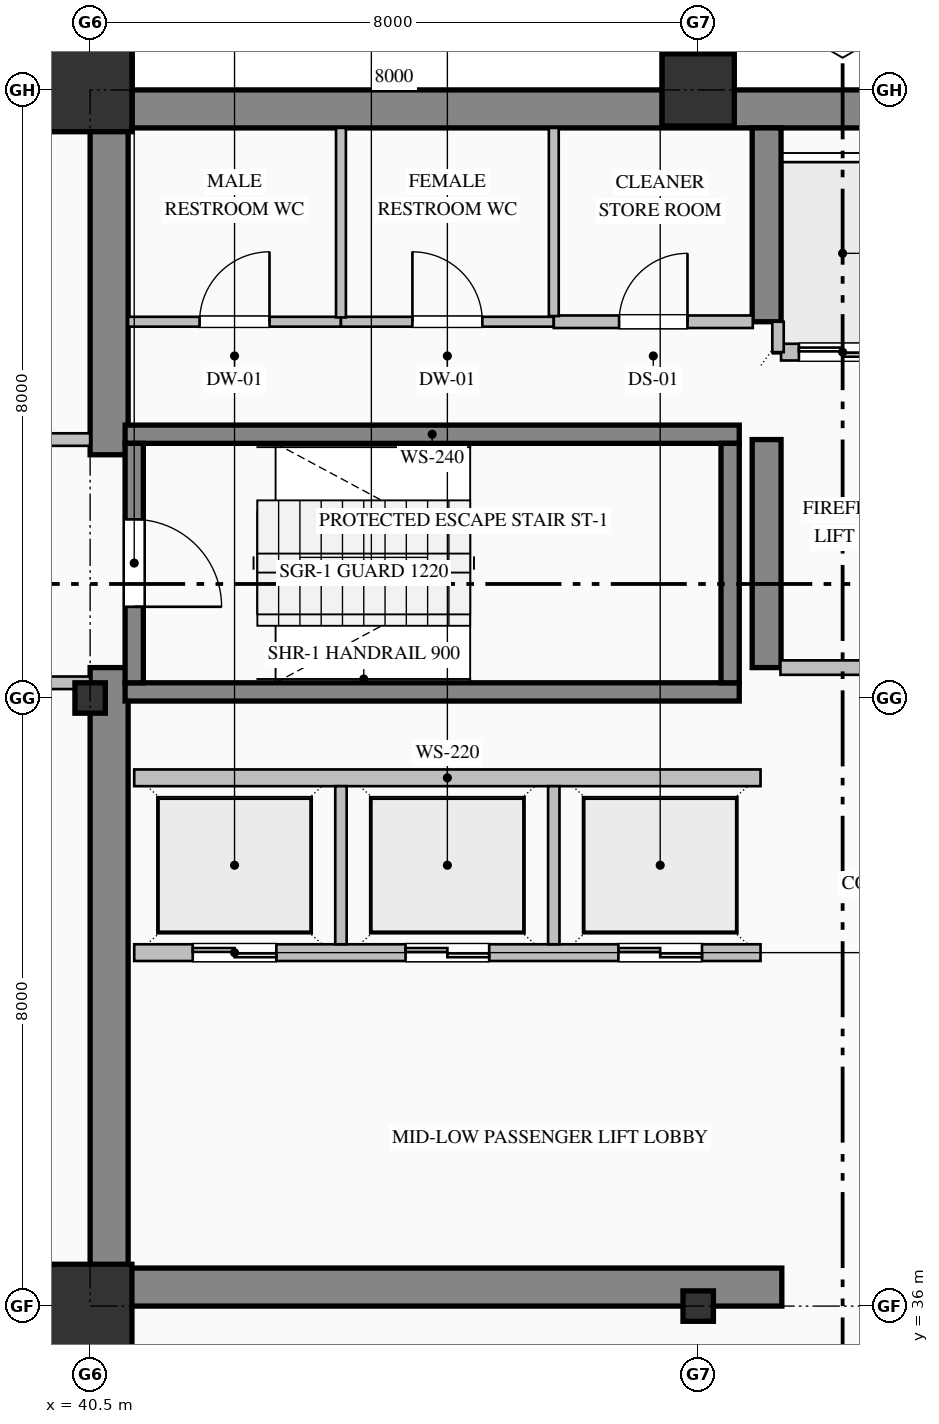
"""IFC4 building model, lengths in metres.
Left out: names, types, materials, properties, quantities, classifications, styles, units other than length and angle.
Written with IfcOpenShell. Run it as: python <this file> out.ifc"""

import sys

from ifc_helpers import new_model, si_unit, direction, frame, frame_2d, origin, origin_2d, place, context, subcontext, project, spatial, rectangle, hollow_rectangle, i_section, extrude, element, fill, save


model = new_model("IFC4")
c1 = context("Model", 3, precision=1e-05, world=origin(), true_north=direction((0.0, 1.0)))
c2 = subcontext(c1, "Body", "Model", "MODEL_VIEW")
j1 = project(units=[si_unit("LENGTHUNIT", "METRE"), si_unit("PLANEANGLEUNIT", "RADIAN")], contexts=[c1])
p1 = place(None, origin())
s1 = spatial("IfcSite", under=j1, at=p1, CompositionType="ELEMENT")
p2 = place(p1, origin())
s2 = spatial("IfcBuilding", under=s1, at=p2, CompositionType="ELEMENT")
p3 = place(p2, frame((0.0, 0.0, 187.0)))
s3 = spatial("IfcBuildingStorey", under=s2, at=p3, CompositionType="ELEMENT", Elevation=187.0)
p4 = place(p3, frame((40.5, 51.75, 0.0), z_axis=(0.0, 0.0, 1.0), x_axis=(1.0, 0.0, 0.0)))
e1 = element("IfcWall", 1, at=p4, inside=s3, PredefinedType="SHEAR", context=c2, shape_type="SweptSolid", body=[
    extrude(rectangle(XDim=23.5, YDim=0.5, at=frame_2d((11.75, 0.0))), origin(), (0.0, 0.0, 1.0), 3.765),
])
p5 = place(p3, frame((40.75, 36.5, 0.0), z_axis=(0.0, 0.0, 1.0), x_axis=(0.0, 1.0, 0.0)))
e2 = element("IfcWall", 2, at=p5, inside=s3, PredefinedType="SHEAR", context=c2, shape_type="SweptSolid", body=[
    extrude(rectangle(XDim=7.9, YDim=0.5, at=frame_2d((3.95, 0.0))), origin(), (0.0, 0.0, 1.0), 3.765),
])
p6 = place(p3, frame((40.75, 47.2, 0.0), z_axis=(0.0, 0.0, 1.0), x_axis=(0.0, 1.0, 0.0)))
e3 = element("IfcWall", 3, at=p6, inside=s3, PredefinedType="SHEAR", context=c2, shape_type="SweptSolid", body=[
    extrude(rectangle(XDim=4.3, YDim=0.5, at=frame_2d((2.15, 0.0))), origin(), (0.0, 0.0, 1.0), 3.765),
])
p7 = place(p3, frame((40.5, 36.25, 0.0), z_axis=(0.0, 0.0, 1.0), x_axis=(1.0, 0.0, 0.0)))
e4 = element("IfcWall", 4, at=p7, inside=s3, PredefinedType="SHEAR", context=c2, shape_type="SweptSolid", body=[
    extrude(rectangle(XDim=9.1, YDim=0.5, at=frame_2d((4.55, 0.0))), origin(), (0.0, 0.0, 1.0), 3.765),
])
p8 = place(p3, frame((49.4, 44.4, 0.0), z_axis=(0.0, 0.0, 1.0), x_axis=(0.0, 1.0, 0.0)))
e5 = element("IfcWall", 5, at=p8, inside=s3, PredefinedType="SHEAR", context=c2, shape_type="SweptSolid", body=[
    extrude(rectangle(XDim=3.0, YDim=0.38, at=frame_2d((1.5, 0.0))), origin(), (0.0, 0.0, 1.0), 3.765),
])
p9 = place(p3, frame((49.4, 48.95, 0.0), z_axis=(0.0, 0.0, 1.0), x_axis=(0.0, 1.0, 0.0)))
e6 = element("IfcWall", 6, at=p9, inside=s3, PredefinedType="SHEAR", context=c2, shape_type="SweptSolid", body=[
    extrude(rectangle(XDim=2.55, YDim=0.38, at=frame_2d((1.275, 0.0))), origin(), (0.0, 0.0, 1.0), 3.765),
])
p10 = place(p3, frame((40.5, 36.0, 0.0), z_axis=(0.0, 0.0, 1.0), x_axis=(1.0, 0.0, 0.0)))
e7 = element("IfcColumn", 7, at=p10, inside=s3, PredefinedType="COLUMN", context=c2, shape_type="SweptSolid", body=[
    extrude(hollow_rectangle(XDim=1.1, YDim=1.1, WallThickness=0.04, at=origin_2d()), origin(), (0.0, 0.0, 1.0), 4.0),
])
p11 = place(p3, frame((40.5, 44.0, 0.0), z_axis=(0.0, 0.0, 1.0), x_axis=(1.0, 0.0, 0.0)))
e8 = element("IfcColumn", 8, at=p11, inside=s3, PredefinedType="COLUMN", context=c2, shape_type="SweptSolid", body=[
    extrude(i_section(OverallWidth=0.4, OverallDepth=0.4, WebThickness=0.013, FlangeThickness=0.021, FilletRadius=0.022, at=origin_2d()), origin(), (0.0, 0.0, 1.0), 4.0),
])
p12 = place(p3, frame((40.5, 52.0, 0.0), z_axis=(0.0, 0.0, 1.0), x_axis=(1.0, 0.0, 0.0)))
e9 = element("IfcColumn", 9, at=p12, inside=s3, PredefinedType="COLUMN", context=c2, shape_type="SweptSolid", body=[
    extrude(hollow_rectangle(XDim=1.1, YDim=1.1, WallThickness=0.04, at=origin_2d()), origin(), (0.0, 0.0, 1.0), 4.0),
])
p13 = place(p3, frame((48.5, 36.0, 0.0), z_axis=(0.0, 0.0, 1.0), x_axis=(1.0, 0.0, 0.0)))
e10 = element("IfcColumn", 10, at=p13, inside=s3, PredefinedType="COLUMN", context=c2, shape_type="SweptSolid", body=[
    extrude(i_section(OverallWidth=0.4, OverallDepth=0.4, WebThickness=0.013, FlangeThickness=0.021, FilletRadius=0.022, at=origin_2d()), origin(), (0.0, 0.0, 1.0), 4.0),
])
p14 = place(p3, frame((48.5, 52.0, 0.0), z_axis=(0.0, 0.0, 1.0), x_axis=(1.0, 0.0, 0.0)))
e11 = element("IfcColumn", 11, at=p14, inside=s3, PredefinedType="COLUMN", context=c2, shape_type="SweptSolid", body=[
    extrude(hollow_rectangle(XDim=0.95, YDim=0.95, WallThickness=0.036, at=origin_2d()), origin(), (0.0, 0.0, 1.0), 4.0),
])
p15 = place(p3, frame((13.0, 51.83, 0.0), z_axis=(0.0, 0.0, 1.0), x_axis=(1.0, 0.0, 0.0)))
e12 = element("IfcWall", 12, at=p15, inside=s3, PredefinedType="SOLIDWALL", context=c2, shape_type="SweptSolid", body=[
    extrude(rectangle(XDim=27.52, YDim=0.34, at=frame_2d((13.76, 0.0))), origin(), (0.0, 0.0, 1.0), 3.265),
])
p16 = place(p15, frame((6.45, 0.0, 0.85)))
e13 = element("IfcOpeningElement", 13, at=p16, cuts=e12, PredefinedType="OPENING", context=c2, shape_type="SweptSolid", body=[
    extrude(rectangle(XDim=1.5, YDim=1.95, at=frame_2d((0.75, 0.975))), frame((0.0, 0.18, 0.0), z_axis=(0.0, -1.0, 0.0), x_axis=(1.0, 0.0, 0.0)), (0.0, 0.0, 1.0), 0.36),
])
p17 = place(p15, frame((13.8, 0.0, 0.7)))
e14 = element("IfcOpeningElement", 14, at=p17, cuts=e12, PredefinedType="OPENING", context=c2, shape_type="SweptSolid", body=[
    extrude(rectangle(XDim=1.2, YDim=1.85, at=frame_2d((0.6, 0.925))), frame((0.0, 0.18, 0.0), z_axis=(0.0, -1.0, 0.0), x_axis=(1.0, 0.0, 0.0)), (0.0, 0.0, 1.0), 0.36),
])
for number, where, z_axis, x_axis in (
    (15, (40.96, 47.47, 0.0), (0.0, 0.0, 1.0), (1.0, 0.0, 0.0)),
    (16, (49.04, 44.08, 0.0), (0.0, 0.0, 1.0), (-1.0, 0.0, 0.0)),
):
    element("IfcWall", number, at=place(p3, frame(where, z_axis=z_axis, x_axis=x_axis)), inside=s3, PredefinedType="SOLIDWALL", context=c2, shape_type="SweptSolid", body=[
        extrude(rectangle(XDim=8.08, YDim=0.24, at=frame_2d((4.04, 0.0))), origin(), (0.0, 0.0, 1.0), 4.0),
    ])
p18 = place(p3, frame((41.08, 47.35, 0.0), z_axis=(0.0, 0.0, 1.0), x_axis=(0.0, -1.0, 0.0)))
e17 = element("IfcWall", 17, at=p18, inside=s3, PredefinedType="SOLIDWALL", context=c2, shape_type="SweptSolid", body=[
    extrude(rectangle(XDim=3.15, YDim=0.24, at=frame_2d((1.575, 0.0))), origin(), (0.0, 0.0, 1.0), 4.0),
])
p19 = place(p18, frame((1.0, 0.0, 0.0)))
e18 = element("IfcOpeningElement", 18, at=p19, cuts=e17, PredefinedType="OPENING", context=c2, shape_type="SweptSolid", body=[
    extrude(rectangle(XDim=1.15, YDim=2.2, at=frame_2d((0.575, 1.1))), frame((0.0, 0.13, 0.0), z_axis=(0.0, -1.0, 0.0), x_axis=(1.0, 0.0, 0.0)), (0.0, 0.0, 1.0), 0.26),
])
p20 = place(p3, frame((48.92, 44.2, 0.0), z_axis=(0.0, 0.0, 1.0), x_axis=(0.0, 1.0, 0.0)))
e19 = element("IfcWall", 19, at=p20, inside=s3, PredefinedType="SOLIDWALL", context=c2, shape_type="SweptSolid", body=[
    extrude(rectangle(XDim=3.15, YDim=0.24, at=frame_2d((1.575, 0.0))), origin(), (0.0, 0.0, 1.0), 4.0),
])
p21 = place(p3, frame((54.71, 48.55, 0.0), z_axis=(0.0, 0.0, 1.0), x_axis=(-1.0, 0.0, 0.0)))
e20 = element("IfcWall", 20, at=p21, inside=s3, PredefinedType="PARTITIONING", context=c2, shape_type="SweptSolid", body=[
    extrude(rectangle(XDim=5.12, YDim=0.22, at=frame_2d((2.56, 0.0))), origin(), (0.0, 0.0, 1.0), 3.765),
])
p22 = place(p21, frame((3.735, 0.0, 0.0)))
e21 = element("IfcOpeningElement", 21, at=p22, cuts=e20, PredefinedType="OPENING", context=c2, shape_type="SweptSolid", body=[
    extrude(rectangle(XDim=1.15, YDim=2.2, at=frame_2d((0.575, 1.1))), frame((0.0, 0.12, 0.0), z_axis=(0.0, -1.0, 0.0), x_axis=(1.0, 0.0, 0.0)), (0.0, 0.0, 1.0), 0.24),
])
p23 = place(p21, frame((0.935, 0.0, 0.0)))
e22 = element("IfcOpeningElement", 22, at=p23, cuts=e20, PredefinedType="OPENING", context=c2, shape_type="SweptSolid", body=[
    extrude(rectangle(XDim=1.15, YDim=2.2, at=frame_2d((0.575, 1.1))), frame((0.0, 0.12, 0.0), z_axis=(0.0, -1.0, 0.0), x_axis=(1.0, 0.0, 0.0)), (0.0, 0.0, 1.0), 0.24),
])
p24 = place(p3, frame((49.55, 48.55, 0.0), z_axis=(0.0, 0.0, 1.0), x_axis=(0.0, 1.0, 0.0)))
e23 = element("IfcWall", 23, at=p24, inside=s3, PredefinedType="PARTITIONING", context=c2, shape_type="SweptSolid", body=[
    extrude(rectangle(XDim=0.4, YDim=0.15, at=frame_2d((0.2, 0.0))), origin(), (0.0, 0.0, 1.0), 3.765),
])
p25 = place(p3, frame((49.32, 40.65, 0.0), z_axis=(0.0, 0.0, 1.0), x_axis=(-1.0, 0.0, 0.0)))
e24 = element("IfcWall", 24, at=p25, inside=s3, PredefinedType="PARTITIONING", context=c2, shape_type="SweptSolid", body=[
    extrude(rectangle(XDim=8.24, YDim=0.22, at=frame_2d((4.12, 0.0))), origin(), (0.0, 0.0, 1.0), 3.765),
])
p26 = place(p25, frame((6.37, 0.0, 0.0)))
e25 = element("IfcOpeningElement", 25, at=p26, cuts=e24, PredefinedType="OPENING", context=c2, shape_type="SweptSolid", body=[
    extrude(rectangle(XDim=1.1, YDim=2.2, at=frame_2d((0.55, 1.1))), frame((0.0, 0.12, 0.0), z_axis=(0.0, -1.0, 0.0), x_axis=(1.0, 0.0, 0.0)), (0.0, 0.0, 1.0), 0.24),
])
p27 = place(p25, frame((3.57, 0.0, 0.0)))
e26 = element("IfcOpeningElement", 26, at=p27, cuts=e24, PredefinedType="OPENING", context=c2, shape_type="SweptSolid", body=[
    extrude(rectangle(XDim=1.1, YDim=2.2, at=frame_2d((0.55, 1.1))), frame((0.0, 0.12, 0.0), z_axis=(0.0, -1.0, 0.0), x_axis=(1.0, 0.0, 0.0)), (0.0, 0.0, 1.0), 0.24),
])
p28 = place(p25, frame((0.77, 0.0, 0.0)))
e27 = element("IfcOpeningElement", 27, at=p28, cuts=e24, PredefinedType="OPENING", context=c2, shape_type="SweptSolid", body=[
    extrude(rectangle(XDim=1.1, YDim=2.2, at=frame_2d((0.55, 1.1))), frame((0.0, 0.12, 0.0), z_axis=(0.0, -1.0, 0.0), x_axis=(1.0, 0.0, 0.0)), (0.0, 0.0, 1.0), 0.24),
])
p29 = place(p3, frame((41.08, 42.95, 0.0), z_axis=(0.0, 0.0, 1.0), x_axis=(1.0, 0.0, 0.0)))
e28 = element("IfcWall", 28, at=p29, inside=s3, PredefinedType="PARTITIONING", context=c2, shape_type="SweptSolid", body=[
    extrude(rectangle(XDim=8.24, YDim=0.22, at=frame_2d((4.12, 0.0))), origin(), (0.0, 0.0, 1.0), 3.765),
])
for number, where, z_axis, x_axis in (
    (29, (43.8, 40.76, 0.0), (0.0, 0.0, 1.0), (0.0, 1.0, 0.0)),
    (30, (46.6, 40.76, 0.0), (0.0, 0.0, 1.0), (0.0, 1.0, 0.0)),
):
    element("IfcWall", number, at=place(p3, frame(where, z_axis=z_axis, x_axis=x_axis)), inside=s3, PredefinedType="PARTITIONING", context=c2, shape_type="SweptSolid", body=[
        extrude(rectangle(XDim=2.08, YDim=0.15, at=frame_2d((1.04, 0.0))), origin(), (0.0, 0.0, 1.0), 3.765),
    ])
p30 = place(p3, frame((37.8, 47.4, 0.0), z_axis=(0.0, 0.0, 1.0), x_axis=(1.0, 0.0, 0.0)))
e31 = element("IfcWall", 31, at=p30, inside=s3, PredefinedType="PARTITIONING", context=c2, shape_type="SweptSolid", body=[
    extrude(rectangle(XDim=2.7, YDim=0.165, at=frame_2d((1.35, 0.0))), origin(), (0.0, 0.0, 1.0), 3.765),
])
p31 = place(p30, frame((0.825, 0.0, 0.0)))
e32 = element("IfcOpeningElement", 32, at=p31, cuts=e31, PredefinedType="OPENING", context=c2, shape_type="SweptSolid", body=[
    extrude(rectangle(XDim=1.05, YDim=2.15, at=frame_2d((0.525, 1.075))), frame((0.0, 0.093, 0.0), z_axis=(0.0, -1.0, 0.0), x_axis=(1.0, 0.0, 0.0)), (0.0, 0.0, 1.0), 0.185),
])
p32 = place(p3, frame((40.5, 44.2, 0.0), z_axis=(0.0, 0.0, 1.0), x_axis=(-1.0, 0.0, 0.0)))
e33 = element("IfcWall", 33, at=p32, inside=s3, PredefinedType="PARTITIONING", context=c2, shape_type="SweptSolid", body=[
    extrude(rectangle(XDim=2.7, YDim=0.165, at=frame_2d((1.35, 0.0))), origin(), (0.0, 0.0, 1.0), 3.765),
])
p33 = place(p32, frame((0.825, 0.0, 0.0)))
e34 = element("IfcOpeningElement", 34, at=p33, cuts=e33, PredefinedType="OPENING", context=c2, shape_type="SweptSolid", body=[
    extrude(rectangle(XDim=1.05, YDim=2.15, at=frame_2d((0.525, 1.075))), frame((0.0, 0.093, 0.0), z_axis=(0.0, -1.0, 0.0), x_axis=(1.0, 0.0, 0.0)), (0.0, 0.0, 1.0), 0.185),
])
p34 = place(p3, frame((41.0, 48.95, 0.0), z_axis=(0.0, 0.0, 1.0), x_axis=(1.0, 0.0, 0.0)))
e35 = element("IfcWall", 35, at=p34, inside=s3, PredefinedType="PARTITIONING", context=c2, shape_type="SweptSolid", body=[
    extrude(rectangle(XDim=2.8, YDim=0.13, at=frame_2d((1.4, 0.0))), origin(), (0.0, 0.0, 1.0), 3.765),
])
p35 = place(p34, frame((0.94, 0.0, 0.0)))
e36 = element("IfcOpeningElement", 36, at=p35, cuts=e35, PredefinedType="OPENING", context=c2, shape_type="SweptSolid", body=[
    extrude(rectangle(XDim=0.92, YDim=2.15, at=frame_2d((0.46, 1.075))), frame((0.0, 0.075, 0.0), z_axis=(0.0, -1.0, 0.0), x_axis=(1.0, 0.0, 0.0)), (0.0, 0.0, 1.0), 0.15),
])
p36 = place(p3, frame((43.8, 48.95, 0.0), z_axis=(0.0, 0.0, 1.0), x_axis=(1.0, 0.0, 0.0)))
e37 = element("IfcWall", 37, at=p36, inside=s3, PredefinedType="PARTITIONING", context=c2, shape_type="SweptSolid", body=[
    extrude(rectangle(XDim=2.8, YDim=0.13, at=frame_2d((1.4, 0.0))), origin(), (0.0, 0.0, 1.0), 3.765),
])
p37 = place(p36, frame((0.94, 0.0, 0.0)))
e38 = element("IfcOpeningElement", 38, at=p37, cuts=e37, PredefinedType="OPENING", context=c2, shape_type="SweptSolid", body=[
    extrude(rectangle(XDim=0.92, YDim=2.15, at=frame_2d((0.46, 1.075))), frame((0.0, 0.075, 0.0), z_axis=(0.0, -1.0, 0.0), x_axis=(1.0, 0.0, 0.0)), (0.0, 0.0, 1.0), 0.15),
])
p38 = place(p3, frame((46.6, 48.95, 0.0), z_axis=(0.0, 0.0, 1.0), x_axis=(1.0, 0.0, 0.0)))
e39 = element("IfcWall", 39, at=p38, inside=s3, PredefinedType="PARTITIONING", context=c2, shape_type="SweptSolid", body=[
    extrude(rectangle(XDim=2.618, YDim=0.165, at=frame_2d((1.309, 0.0))), origin(), (0.0, 0.0, 1.0), 3.765),
])
p39 = place(p38, frame((0.859, 0.0, 0.0)))
e40 = element("IfcOpeningElement", 40, at=p39, cuts=e39, PredefinedType="OPENING", context=c2, shape_type="SweptSolid", body=[
    extrude(rectangle(XDim=0.9, YDim=2.15, at=frame_2d((0.45, 1.075))), frame((0.0, 0.093, 0.0), z_axis=(0.0, -1.0, 0.0), x_axis=(1.0, 0.0, 0.0)), (0.0, 0.0, 1.0), 0.185),
])
p40 = place(p3, frame((54.718, 44.4, 0.0), z_axis=(0.0, 0.0, 1.0), x_axis=(-1.0, 0.0, 0.0)))
e41 = element("IfcWall", 41, at=p40, inside=s3, PredefinedType="PARTITIONING", context=c2, shape_type="SweptSolid", body=[
    extrude(rectangle(XDim=5.136, YDim=0.19, at=frame_2d((2.568, 0.0))), origin(), (0.0, 0.0, 1.0), 3.765),
])
p41 = place(p40, frame((2.043, 0.0, 0.0)))
e42 = element("IfcOpeningElement", 42, at=p41, cuts=e41, PredefinedType="OPENING", context=c2, shape_type="SweptSolid", body=[
    extrude(rectangle(XDim=1.05, YDim=2.15, at=frame_2d((0.525, 1.075))), frame((0.0, 0.105, 0.0), z_axis=(0.0, -1.0, 0.0), x_axis=(1.0, 0.0, 0.0)), (0.0, 0.0, 1.0), 0.21),
])
p42 = place(p3, frame((43.8, 51.5, 0.0), z_axis=(0.0, 0.0, 1.0), x_axis=(0.0, -1.0, 0.0)))
e43 = element("IfcWall", 43, at=p42, inside=s3, PredefinedType="PARTITIONING", context=c2, shape_type="SweptSolid", body=[
    extrude(rectangle(XDim=2.493, YDim=0.13, at=frame_2d((1.247, 0.0))), origin(), (0.0, 0.0, 1.0), 3.765),
])
p43 = place(p3, frame((46.6, 51.5, 0.0), z_axis=(0.0, 0.0, 1.0), x_axis=(0.0, -1.0, 0.0)))
e44 = element("IfcWall", 44, at=p43, inside=s3, PredefinedType="PARTITIONING", context=c2, shape_type="SweptSolid", body=[
    extrude(rectangle(XDim=2.476, YDim=0.13, at=frame_2d((1.238, 0.0))), origin(), (0.0, 0.0, 1.0), 3.765),
])
p44 = place(p19, origin())
e45 = element("IfcDoor", 45, at=p44, inside=s3, OperationType="SINGLE_SWING_RIGHT", PredefinedType="DOOR", context=c2, shape_type="SweptSolid", body=[
    extrude(rectangle(XDim=1.15, YDim=2.2, at=frame_2d((0.575, 1.1))), frame((0.0, 0.025, 0.0), z_axis=(0.0, -1.0, 0.0), x_axis=(1.0, 0.0, 0.0)), (0.0, 0.0, 1.0), 0.05),
])
fill(e18, e45)
p45 = place(p22, origin())
e46 = element("IfcDoor", 46, at=p45, inside=s3, OperationType="DOUBLE_DOOR_SLIDING", PredefinedType="DOOR", context=c2, shape_type="SweptSolid", body=[
    extrude(rectangle(XDim=1.15, YDim=2.2, at=frame_2d((0.575, 1.1))), frame((0.0, 0.025, 0.0), z_axis=(0.0, -1.0, 0.0), x_axis=(1.0, 0.0, 0.0)), (0.0, 0.0, 1.0), 0.05),
])
fill(e21, e46)
p46 = place(p26, origin())
e47 = element("IfcDoor", 47, at=p46, inside=s3, OperationType="DOUBLE_DOOR_SLIDING", PredefinedType="DOOR", context=c2, shape_type="SweptSolid", body=[
    extrude(rectangle(XDim=1.1, YDim=2.2, at=frame_2d((0.55, 1.1))), frame((0.0, 0.025, 0.0), z_axis=(0.0, -1.0, 0.0), x_axis=(1.0, 0.0, 0.0)), (0.0, 0.0, 1.0), 0.05),
])
fill(e25, e47)
p47 = place(p27, origin())
e48 = element("IfcDoor", 48, at=p47, inside=s3, OperationType="DOUBLE_DOOR_SLIDING", PredefinedType="DOOR", context=c2, shape_type="SweptSolid", body=[
    extrude(rectangle(XDim=1.1, YDim=2.2, at=frame_2d((0.55, 1.1))), frame((0.0, 0.025, 0.0), z_axis=(0.0, -1.0, 0.0), x_axis=(1.0, 0.0, 0.0)), (0.0, 0.0, 1.0), 0.05),
])
fill(e26, e48)
p48 = place(p28, origin())
e49 = element("IfcDoor", 49, at=p48, inside=s3, OperationType="DOUBLE_DOOR_SLIDING", PredefinedType="DOOR", context=c2, shape_type="SweptSolid", body=[
    extrude(rectangle(XDim=1.1, YDim=2.2, at=frame_2d((0.55, 1.1))), frame((0.0, 0.025, 0.0), z_axis=(0.0, -1.0, 0.0), x_axis=(1.0, 0.0, 0.0)), (0.0, 0.0, 1.0), 0.05),
])
fill(e27, e49)
p49 = place(p35, origin())
e50 = element("IfcDoor", 50, at=p49, inside=s3, OperationType="SINGLE_SWING_RIGHT", PredefinedType="DOOR", context=c2, shape_type="SweptSolid", body=[
    extrude(rectangle(XDim=0.92, YDim=2.15, at=frame_2d((0.46, 1.075))), frame((0.0, 0.025, 0.0), z_axis=(0.0, -1.0, 0.0), x_axis=(1.0, 0.0, 0.0)), (0.0, 0.0, 1.0), 0.05),
])
fill(e36, e50)
p50 = place(p37, origin())
e51 = element("IfcDoor", 51, at=p50, inside=s3, OperationType="SINGLE_SWING_LEFT", PredefinedType="DOOR", context=c2, shape_type="SweptSolid", body=[
    extrude(rectangle(XDim=0.92, YDim=2.15, at=frame_2d((0.46, 1.075))), frame((0.0, 0.025, 0.0), z_axis=(0.0, -1.0, 0.0), x_axis=(1.0, 0.0, 0.0)), (0.0, 0.0, 1.0), 0.05),
])
fill(e38, e51)
p51 = place(p39, origin())
e52 = element("IfcDoor", 52, at=p51, inside=s3, OperationType="SINGLE_SWING_RIGHT", PredefinedType="DOOR", context=c2, shape_type="SweptSolid", body=[
    extrude(rectangle(XDim=0.9, YDim=2.15, at=frame_2d((0.45, 1.075))), frame((0.0, 0.025, 0.0), z_axis=(0.0, -1.0, 0.0), x_axis=(1.0, 0.0, 0.0)), (0.0, 0.0, 1.0), 0.05),
])
fill(e40, e52)
save(model, sys.argv[1])
